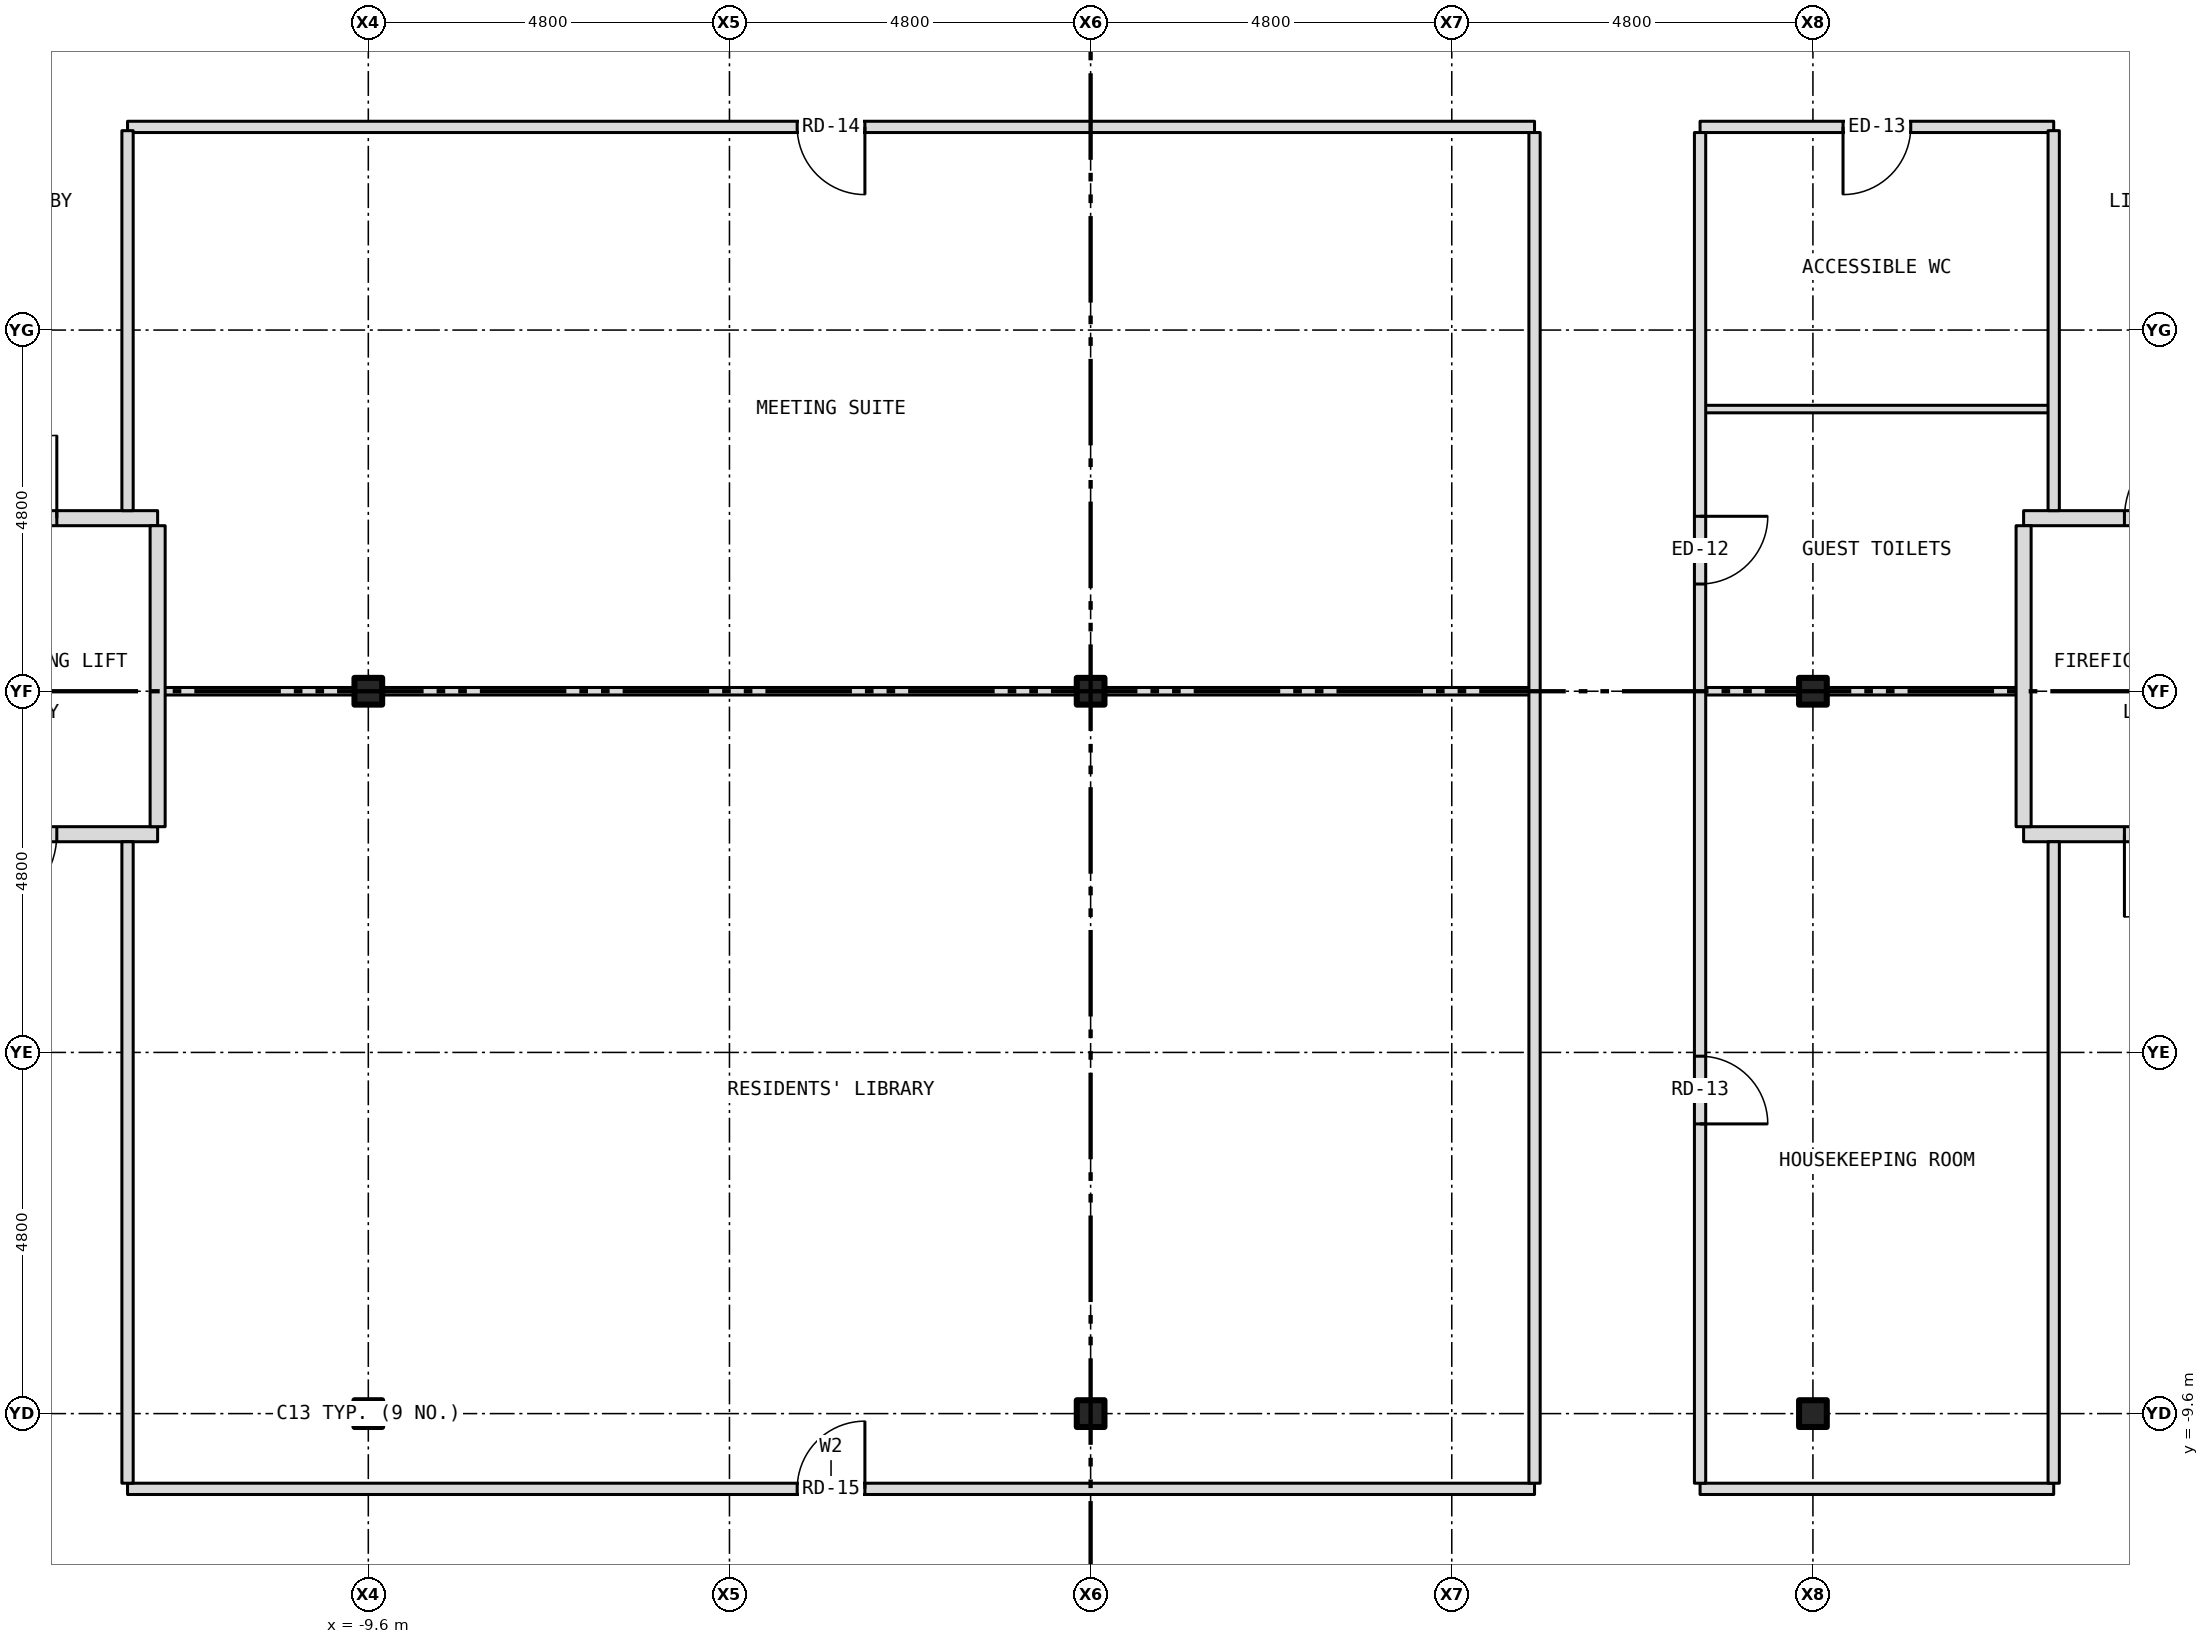
"""IFC4 building model, lengths in metres.
Left out: names, types, materials, properties, quantities, classifications, styles, units other than length and angle.
Written with IfcOpenShell. Run it as: python <this file> out.ifc"""

import sys

from ifc_helpers import new_model, si_unit, direction, frame, frame_2d, origin, origin_2d, place, context, subcontext, project, spatial, rectangle, i_section, extrude, element, fill, save


model = new_model("IFC4")
c1 = context("Model", 3, precision=1e-05, world=origin(), true_north=direction((0.0, 1.0)))
c2 = subcontext(c1, "Body", "Model", "MODEL_VIEW")
j1 = project(units=[si_unit("LENGTHUNIT", "METRE"), si_unit("PLANEANGLEUNIT", "RADIAN")], contexts=[c1])
p1 = place(None, origin())
s1 = spatial("IfcSite", under=j1, at=p1, CompositionType="ELEMENT")
p2 = place(p1, origin())
s2 = spatial("IfcBuilding", under=s1, at=p2, CompositionType="ELEMENT")
p3 = place(p2, frame((0.0, 0.0, 258.5)))
s3 = spatial("IfcBuildingStorey", under=s2, at=p3, CompositionType="ELEMENT", Elevation=258.5)
for number, where, z_axis, x_axis in (
    (1, (-9.6, -9.6, -0.15), (0.0, 0.0, 1.0), (1.0, 0.0, 0.0)),
    (2, (-9.6, 0.0, -0.15), (0.0, 0.0, 1.0), (1.0, 0.0, 0.0)),
    (3, (0.0, -9.6, -0.15), (0.0, 0.0, 1.0), (1.0, 0.0, 0.0)),
    (4, (0.0, 0.0, -0.15), (0.0, 0.0, 1.0), (1.0, 0.0, 0.0)),
    (5, (9.6, -9.6, -0.15), (0.0, 0.0, 1.0), (1.0, 0.0, 0.0)),
    (6, (9.6, 0.0, -0.15), (0.0, 0.0, 1.0), (1.0, 0.0, 0.0)),
):
    element("IfcColumn", number, at=place(p3, frame(where, z_axis=z_axis, x_axis=x_axis)), inside=s3, PredefinedType="COLUMN", context=c2, shape_type="SweptSolid", body=[
        extrude(i_section(OverallWidth=0.368, OverallDepth=0.356, WebThickness=0.011, FlangeThickness=0.018, at=origin_2d()), origin(), (0.0, 0.0, 1.0), 3.5),
    ])
p4 = place(p3, frame((-12.8, -10.6, 0.0), z_axis=(0.0, 0.0, 1.0), x_axis=(1.0, 0.0, 0.0)))
e7 = element("IfcWall", 7, at=p4, inside=s3, PredefinedType="PARTITIONING", context=c2, shape_type="SweptSolid", body=[
    extrude(rectangle(XDim=18.7, YDim=0.15, at=frame_2d((9.35, 0.0))), origin(), (0.0, 0.0, 1.0), 3.35),
])
p5 = place(p4, frame((8.9, 0.0, 0.0)))
e8 = element("IfcOpeningElement", 8, at=p5, cuts=e7, PredefinedType="OPENING", context=c2, shape_type="SweptSolid", body=[
    extrude(rectangle(XDim=0.9, YDim=2.1, at=frame_2d((0.45, 1.05))), frame((0.0, 0.087, 0.0), z_axis=(0.0, -1.0, 0.0), x_axis=(1.0, 0.0, 0.0)), (0.0, 0.0, 1.0), 0.174),
])
p6 = place(p3, frame((8.1, -10.6, 0.0), z_axis=(0.0, 0.0, 1.0), x_axis=(1.0, 0.0, 0.0)))
e9 = element("IfcWall", 9, at=p6, inside=s3, PredefinedType="PARTITIONING", context=c2, shape_type="SweptSolid", body=[
    extrude(rectangle(XDim=4.7, YDim=0.15, at=frame_2d((2.35, 0.0))), origin(), (0.0, 0.0, 1.0), 3.35),
])
p7 = place(p3, frame((-15.68, -1.9, 0.0), z_axis=(0.0, 0.0, 1.0), x_axis=(1.0, 0.0, 0.0)))
e10 = element("IfcWall", 10, at=p7, inside=s3, PredefinedType="PARTITIONING", context=c2, shape_type="SweptSolid", body=[
    extrude(rectangle(XDim=3.28, YDim=0.2, at=frame_2d((1.64, 0.0))), origin(), (0.0, 0.0, 1.0), 3.35),
])
p8 = place(p7, frame((0.84, 0.0, 0.0)))
e11 = element("IfcOpeningElement", 11, at=p8, cuts=e10, PredefinedType="OPENING", context=c2, shape_type="SweptSolid", body=[
    extrude(rectangle(XDim=1.1, YDim=2.1, at=frame_2d((0.55, 1.05))), frame((0.0, 0.112, 0.0), z_axis=(0.0, -1.0, 0.0), x_axis=(1.0, 0.0, 0.0)), (0.0, 0.0, 1.0), 0.224),
])
p9 = place(p3, frame((12.4, -1.9, 0.0), z_axis=(0.0, 0.0, 1.0), x_axis=(1.0, 0.0, 0.0)))
e12 = element("IfcWall", 12, at=p9, inside=s3, PredefinedType="PARTITIONING", context=c2, shape_type="SweptSolid", body=[
    extrude(rectangle(XDim=3.28, YDim=0.2, at=frame_2d((1.64, 0.0))), origin(), (0.0, 0.0, 1.0), 3.35),
])
p10 = place(p9, frame((1.34, 0.0, 0.0)))
e13 = element("IfcOpeningElement", 13, at=p10, cuts=e12, PredefinedType="OPENING", context=c2, shape_type="SweptSolid", body=[
    extrude(rectangle(XDim=1.1, YDim=2.1, at=frame_2d((0.55, 1.05))), frame((0.0, 0.112, 0.0), z_axis=(0.0, -1.0, 0.0), x_axis=(1.0, 0.0, 0.0)), (0.0, 0.0, 1.0), 0.224),
])
p11 = place(p3, frame((-12.4, 0.0, 0.0), z_axis=(0.0, 0.0, 1.0), x_axis=(1.0, 0.0, 0.0)))
e14 = element("IfcWall", 14, at=p11, inside=s3, PredefinedType="PARTITIONING", context=c2, shape_type="SweptSolid", body=[
    extrude(rectangle(XDim=2.616, YDim=0.1, at=frame_2d((1.308, 0.0))), origin(), (0.0, 0.0, 1.0), 2.728),
])
p12 = place(p3, frame((-9.784, 0.0, 0.0), z_axis=(0.0, 0.0, 1.0), x_axis=(1.0, 0.0, 0.0)))
e15 = element("IfcWall", 15, at=p12, inside=s3, PredefinedType="PARTITIONING", context=c2, shape_type="SweptSolid", body=[
    extrude(rectangle(XDim=0.368, YDim=0.1, at=frame_2d((0.184, 0.0))), origin(), (0.0, 0.0, 1.0), 3.35),
])
p13 = place(p3, frame((-9.416, 0.0, 0.0), z_axis=(0.0, 0.0, 1.0), x_axis=(1.0, 0.0, 0.0)))
e16 = element("IfcWall", 16, at=p13, inside=s3, PredefinedType="PARTITIONING", context=c2, shape_type="SweptSolid", body=[
    extrude(rectangle(XDim=9.232, YDim=0.1, at=frame_2d((4.616, 0.0))), origin(), (0.0, 0.0, 1.0), 2.728),
])
p14 = place(p3, frame((-0.184, 0.0, 0.0), z_axis=(0.0, 0.0, 1.0), x_axis=(1.0, 0.0, 0.0)))
e17 = element("IfcWall", 17, at=p14, inside=s3, PredefinedType="PARTITIONING", context=c2, shape_type="SweptSolid", body=[
    extrude(rectangle(XDim=0.368, YDim=0.1, at=frame_2d((0.184, 0.0))), origin(), (0.0, 0.0, 1.0), 3.35),
])
p15 = place(p3, frame((0.184, 0.0, 0.0), z_axis=(0.0, 0.0, 1.0), x_axis=(1.0, 0.0, 0.0)))
e18 = element("IfcWall", 18, at=p15, inside=s3, PredefinedType="PARTITIONING", context=c2, shape_type="SweptSolid", body=[
    extrude(rectangle(XDim=5.716, YDim=0.1, at=frame_2d((2.858, 0.0))), origin(), (0.0, 0.0, 1.0), 2.728),
])
p16 = place(p3, frame((8.1, 0.0, 0.0), z_axis=(0.0, 0.0, 1.0), x_axis=(1.0, 0.0, 0.0)))
e19 = element("IfcWall", 19, at=p16, inside=s3, PredefinedType="PARTITIONING", context=c2, shape_type="SweptSolid", body=[
    extrude(rectangle(XDim=1.316, YDim=0.1, at=frame_2d((0.658, 0.0))), origin(), (0.0, 0.0, 1.0), 2.728),
])
p17 = place(p3, frame((9.416, 0.0, 0.0), z_axis=(0.0, 0.0, 1.0), x_axis=(1.0, 0.0, 0.0)))
e20 = element("IfcWall", 20, at=p17, inside=s3, PredefinedType="PARTITIONING", context=c2, shape_type="SweptSolid", body=[
    extrude(rectangle(XDim=0.368, YDim=0.1, at=frame_2d((0.184, 0.0))), origin(), (0.0, 0.0, 1.0), 3.35),
])
p18 = place(p3, frame((9.784, 0.0, 0.0), z_axis=(0.0, 0.0, 1.0), x_axis=(1.0, 0.0, 0.0)))
e21 = element("IfcWall", 21, at=p18, inside=s3, PredefinedType="PARTITIONING", context=c2, shape_type="SweptSolid", body=[
    extrude(rectangle(XDim=2.616, YDim=0.1, at=frame_2d((1.308, 0.0))), origin(), (0.0, 0.0, 1.0), 2.728),
])
p19 = place(p3, frame((-15.68, 2.3, 0.0), z_axis=(0.0, 0.0, 1.0), x_axis=(1.0, 0.0, 0.0)))
e22 = element("IfcWall", 22, at=p19, inside=s3, PredefinedType="PARTITIONING", context=c2, shape_type="SweptSolid", body=[
    extrude(rectangle(XDim=3.28, YDim=0.2, at=frame_2d((1.64, 0.0))), origin(), (0.0, 0.0, 1.0), 3.35),
])
p20 = place(p19, frame((0.84, 0.0, 0.0)))
e23 = element("IfcOpeningElement", 23, at=p20, cuts=e22, PredefinedType="OPENING", context=c2, shape_type="SweptSolid", body=[
    extrude(rectangle(XDim=1.1, YDim=2.1, at=frame_2d((0.55, 1.05))), frame((0.0, 0.112, 0.0), z_axis=(0.0, -1.0, 0.0), x_axis=(1.0, 0.0, 0.0)), (0.0, 0.0, 1.0), 0.224),
])
p21 = place(p3, frame((12.4, 2.3, 0.0), z_axis=(0.0, 0.0, 1.0), x_axis=(1.0, 0.0, 0.0)))
e24 = element("IfcWall", 24, at=p21, inside=s3, PredefinedType="PARTITIONING", context=c2, shape_type="SweptSolid", body=[
    extrude(rectangle(XDim=3.28, YDim=0.2, at=frame_2d((1.64, 0.0))), origin(), (0.0, 0.0, 1.0), 3.35),
])
p22 = place(p21, frame((1.34, 0.0, 0.0)))
e25 = element("IfcOpeningElement", 25, at=p22, cuts=e24, PredefinedType="OPENING", context=c2, shape_type="SweptSolid", body=[
    extrude(rectangle(XDim=1.1, YDim=2.1, at=frame_2d((0.55, 1.05))), frame((0.0, 0.112, 0.0), z_axis=(0.0, -1.0, 0.0), x_axis=(1.0, 0.0, 0.0)), (0.0, 0.0, 1.0), 0.224),
])
p23 = place(p3, frame((8.1, 3.75, 0.0), z_axis=(0.0, 0.0, 1.0), x_axis=(1.0, 0.0, 0.0)))
e26 = element("IfcWall", 26, at=p23, inside=s3, PredefinedType="PARTITIONING", context=c2, shape_type="SweptSolid", body=[
    extrude(rectangle(XDim=4.7, YDim=0.1, at=frame_2d((2.35, 0.0))), origin(), (0.0, 0.0, 1.0), 3.35),
])
p24 = place(p3, frame((-12.8, 7.5, 0.0), z_axis=(0.0, 0.0, 1.0), x_axis=(1.0, 0.0, 0.0)))
e27 = element("IfcWall", 27, at=p24, inside=s3, PredefinedType="PARTITIONING", context=c2, shape_type="SweptSolid", body=[
    extrude(rectangle(XDim=18.7, YDim=0.15, at=frame_2d((9.35, 0.0))), origin(), (0.0, 0.0, 1.0), 3.35),
])
p25 = place(p24, frame((8.9, 0.0, 0.0)))
e28 = element("IfcOpeningElement", 28, at=p25, cuts=e27, PredefinedType="OPENING", context=c2, shape_type="SweptSolid", body=[
    extrude(rectangle(XDim=0.9, YDim=2.1, at=frame_2d((0.45, 1.05))), frame((0.0, 0.087, 0.0), z_axis=(0.0, -1.0, 0.0), x_axis=(1.0, 0.0, 0.0)), (0.0, 0.0, 1.0), 0.174),
])
p26 = place(p3, frame((8.1, 7.5, 0.0), z_axis=(0.0, 0.0, 1.0), x_axis=(1.0, 0.0, 0.0)))
e29 = element("IfcWall", 29, at=p26, inside=s3, PredefinedType="PARTITIONING", context=c2, shape_type="SweptSolid", body=[
    extrude(rectangle(XDim=4.7, YDim=0.15, at=frame_2d((2.35, 0.0))), origin(), (0.0, 0.0, 1.0), 3.35),
])
p27 = place(p26, frame((1.9, 0.0, 0.0)))
e30 = element("IfcOpeningElement", 30, at=p27, cuts=e29, PredefinedType="OPENING", context=c2, shape_type="SweptSolid", body=[
    extrude(rectangle(XDim=0.9, YDim=2.1, at=frame_2d((0.45, 1.05))), frame((0.0, 0.087, 0.0), z_axis=(0.0, -1.0, 0.0), x_axis=(1.0, 0.0, 0.0)), (0.0, 0.0, 1.0), 0.174),
])
p28 = place(p3, frame((-12.8, -10.525, 0.0), z_axis=(0.0, 0.0, 1.0), x_axis=(0.0, 1.0, 0.0)))
e31 = element("IfcWall", 31, at=p28, inside=s3, PredefinedType="PARTITIONING", context=c2, shape_type="SweptSolid", body=[
    extrude(rectangle(XDim=8.525, YDim=0.15, at=frame_2d((4.262, 0.0))), origin(), (0.0, 0.0, 1.0), 3.35),
])
p29 = place(p3, frame((-12.8, 2.4, 0.0), z_axis=(0.0, 0.0, 1.0), x_axis=(0.0, 1.0, 0.0)))
e32 = element("IfcWall", 32, at=p29, inside=s3, PredefinedType="PARTITIONING", context=c2, shape_type="SweptSolid", body=[
    extrude(rectangle(XDim=5.05, YDim=0.15, at=frame_2d((2.525, 0.0))), origin(), (0.0, 0.0, 1.0), 3.35),
])
p30 = place(p3, frame((-12.4, -1.8, 0.0), z_axis=(0.0, 0.0, 1.0), x_axis=(0.0, 1.0, 0.0)))
e33 = element("IfcWall", 33, at=p30, inside=s3, PredefinedType="PARTITIONING", context=c2, shape_type="SweptSolid", body=[
    extrude(rectangle(XDim=4.0, YDim=0.2, at=frame_2d((2.0, 0.0))), origin(), (0.0, 0.0, 1.0), 3.35),
])
p31 = place(p3, frame((5.9, -10.525, 0.0), z_axis=(0.0, 0.0, 1.0), x_axis=(0.0, 1.0, 0.0)))
e34 = element("IfcWall", 34, at=p31, inside=s3, PredefinedType="PARTITIONING", context=c2, shape_type="SweptSolid", body=[
    extrude(rectangle(XDim=17.95, YDim=0.15, at=frame_2d((8.975, 0.0))), origin(), (0.0, 0.0, 1.0), 3.35),
])
p32 = place(p3, frame((8.1, -10.525, 0.0), z_axis=(0.0, 0.0, 1.0), x_axis=(0.0, 1.0, 0.0)))
e35 = element("IfcWall", 35, at=p32, inside=s3, PredefinedType="PARTITIONING", context=c2, shape_type="SweptSolid", body=[
    extrude(rectangle(XDim=17.95, YDim=0.15, at=frame_2d((8.975, 0.0))), origin(), (0.0, 0.0, 1.0), 3.35),
])
p33 = place(p32, frame((11.95, 0.0, 0.0)))
e36 = element("IfcOpeningElement", 36, at=p33, cuts=e35, PredefinedType="OPENING", context=c2, shape_type="SweptSolid", body=[
    extrude(rectangle(XDim=0.9, YDim=2.1, at=frame_2d((0.45, 1.05))), frame((0.0, 0.087, 0.0), z_axis=(0.0, -1.0, 0.0), x_axis=(1.0, 0.0, 0.0)), (0.0, 0.0, 1.0), 0.174),
])
p34 = place(p32, frame((4.775, 0.0, 0.0)))
e37 = element("IfcOpeningElement", 37, at=p34, cuts=e35, PredefinedType="OPENING", context=c2, shape_type="SweptSolid", body=[
    extrude(rectangle(XDim=0.9, YDim=2.1, at=frame_2d((0.45, 1.05))), frame((0.0, 0.087, 0.0), z_axis=(0.0, -1.0, 0.0), x_axis=(1.0, 0.0, 0.0)), (0.0, 0.0, 1.0), 0.174),
])
p35 = place(p3, frame((12.4, -1.8, 0.0), z_axis=(0.0, 0.0, 1.0), x_axis=(0.0, 1.0, 0.0)))
e38 = element("IfcWall", 38, at=p35, inside=s3, PredefinedType="PARTITIONING", context=c2, shape_type="SweptSolid", body=[
    extrude(rectangle(XDim=4.0, YDim=0.2, at=frame_2d((2.0, 0.0))), origin(), (0.0, 0.0, 1.0), 3.35),
])
p36 = place(p3, frame((12.8, -10.525, 0.0), z_axis=(0.0, 0.0, 1.0), x_axis=(0.0, 1.0, 0.0)))
e39 = element("IfcWall", 39, at=p36, inside=s3, PredefinedType="PARTITIONING", context=c2, shape_type="SweptSolid", body=[
    extrude(rectangle(XDim=8.525, YDim=0.15, at=frame_2d((4.262, 0.0))), origin(), (0.0, 0.0, 1.0), 3.35),
])
p37 = place(p3, frame((12.8, 2.4, 0.0), z_axis=(0.0, 0.0, 1.0), x_axis=(0.0, 1.0, 0.0)))
e40 = element("IfcWall", 40, at=p37, inside=s3, PredefinedType="PARTITIONING", context=c2, shape_type="SweptSolid", body=[
    extrude(rectangle(XDim=5.05, YDim=0.15, at=frame_2d((2.525, 0.0))), origin(), (0.0, 0.0, 1.0), 3.35),
])
p38 = place(p20, origin())
e41 = element("IfcDoor", 41, at=p38, inside=s3, OperationType="SINGLE_SWING_RIGHT", PredefinedType="DOOR", context=c2, shape_type="SweptSolid", body=[
    extrude(rectangle(XDim=1.1, YDim=2.1, at=frame_2d((0.55, 1.05))), frame((0.0, 0.025, 0.0), z_axis=(0.0, -1.0, 0.0), x_axis=(1.0, 0.0, 0.0)), (0.0, 0.0, 1.0), 0.05),
])
fill(e23, e41)
p39 = place(p8, origin())
e42 = element("IfcDoor", 42, at=p39, inside=s3, OperationType="SINGLE_SWING_LEFT", PredefinedType="DOOR", context=c2, shape_type="SweptSolid", body=[
    extrude(rectangle(XDim=1.1, YDim=2.1, at=frame_2d((0.55, 1.05))), frame((0.0, 0.025, 0.0), z_axis=(0.0, -1.0, 0.0), x_axis=(1.0, 0.0, 0.0)), (0.0, 0.0, 1.0), 0.05),
])
fill(e11, e42)
p40 = place(p22, origin())
e43 = element("IfcDoor", 43, at=p40, inside=s3, OperationType="SINGLE_SWING_RIGHT", PredefinedType="DOOR", context=c2, shape_type="SweptSolid", body=[
    extrude(rectangle(XDim=1.1, YDim=2.1, at=frame_2d((0.55, 1.05))), frame((0.0, 0.025, 0.0), z_axis=(0.0, -1.0, 0.0), x_axis=(1.0, 0.0, 0.0)), (0.0, 0.0, 1.0), 0.05),
])
fill(e25, e43)
p41 = place(p10, origin())
e44 = element("IfcDoor", 44, at=p41, inside=s3, OperationType="SINGLE_SWING_LEFT", PredefinedType="DOOR", context=c2, shape_type="SweptSolid", body=[
    extrude(rectangle(XDim=1.1, YDim=2.1, at=frame_2d((0.55, 1.05))), frame((0.0, 0.025, 0.0), z_axis=(0.0, -1.0, 0.0), x_axis=(1.0, 0.0, 0.0)), (0.0, 0.0, 1.0), 0.05),
])
fill(e13, e44)
p42 = place(p33, origin())
e45 = element("IfcDoor", 45, at=p42, inside=s3, OperationType="SINGLE_SWING_RIGHT", PredefinedType="DOOR", context=c2, shape_type="SweptSolid", body=[
    extrude(rectangle(XDim=0.9, YDim=2.1, at=frame_2d((0.45, 1.05))), frame((0.0, 0.025, 0.0), z_axis=(0.0, -1.0, 0.0), x_axis=(1.0, 0.0, 0.0)), (0.0, 0.0, 1.0), 0.05),
])
fill(e36, e45)
p43 = place(p27, origin())
e46 = element("IfcDoor", 46, at=p43, inside=s3, OperationType="SINGLE_SWING_LEFT", PredefinedType="DOOR", context=c2, shape_type="SweptSolid", body=[
    extrude(rectangle(XDim=0.9, YDim=2.1, at=frame_2d((0.45, 1.05))), frame((0.0, 0.025, 0.0), z_axis=(0.0, -1.0, 0.0), x_axis=(1.0, 0.0, 0.0)), (0.0, 0.0, 1.0), 0.05),
])
fill(e30, e46)
p44 = place(p34, origin())
e47 = element("IfcDoor", 47, at=p44, inside=s3, OperationType="SINGLE_SWING_LEFT", PredefinedType="DOOR", context=c2, shape_type="SweptSolid", body=[
    extrude(rectangle(XDim=0.9, YDim=2.1, at=frame_2d((0.45, 1.05))), frame((0.0, 0.025, 0.0), z_axis=(0.0, -1.0, 0.0), x_axis=(1.0, 0.0, 0.0)), (0.0, 0.0, 1.0), 0.05),
])
fill(e37, e47)
p45 = place(p25, origin())
e48 = element("IfcDoor", 48, at=p45, inside=s3, OperationType="SINGLE_SWING_RIGHT", PredefinedType="DOOR", context=c2, shape_type="SweptSolid", body=[
    extrude(rectangle(XDim=0.9, YDim=2.1, at=frame_2d((0.45, 1.05))), frame((0.0, 0.025, 0.0), z_axis=(0.0, -1.0, 0.0), x_axis=(1.0, 0.0, 0.0)), (0.0, 0.0, 1.0), 0.05),
])
fill(e28, e48)
p46 = place(p5, origin())
e49 = element("IfcDoor", 49, at=p46, inside=s3, OperationType="SINGLE_SWING_RIGHT", PredefinedType="DOOR", context=c2, shape_type="SweptSolid", body=[
    extrude(rectangle(XDim=0.9, YDim=2.1, at=frame_2d((0.45, 1.05))), frame((0.0, 0.025, 0.0), z_axis=(0.0, -1.0, 0.0), x_axis=(1.0, 0.0, 0.0)), (0.0, 0.0, 1.0), 0.05),
])
fill(e8, e49)
save(model, sys.argv[1])
